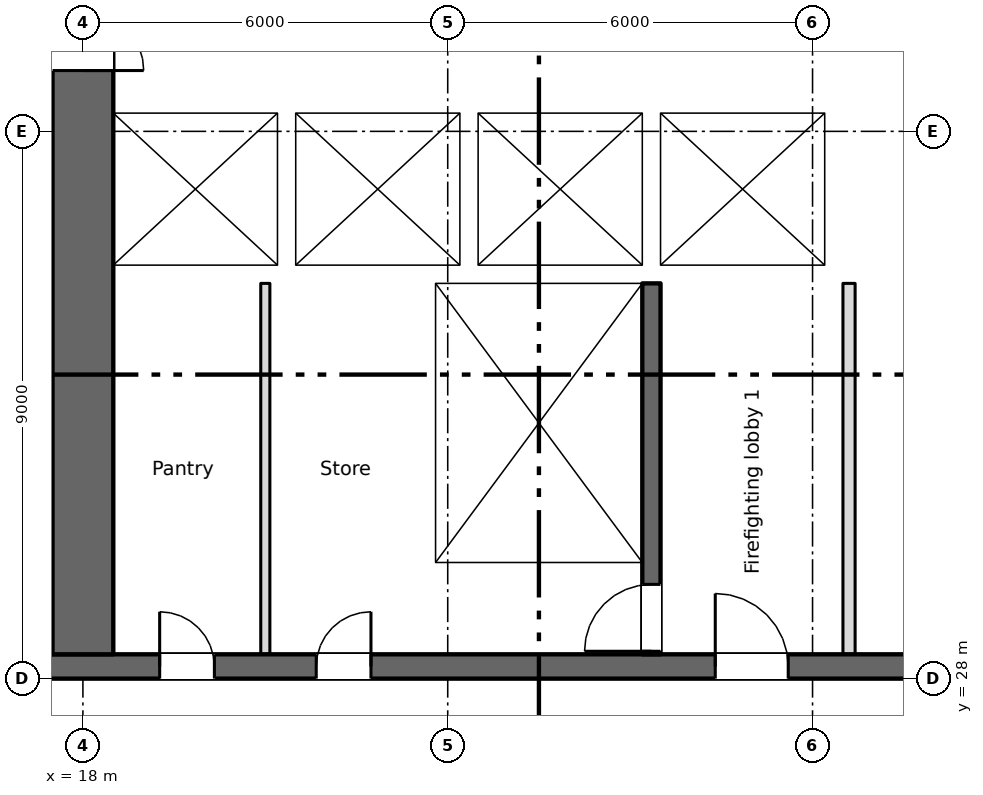
"""IFC4 building model, lengths in metres.
Left out: names, types, materials, properties, quantities, classifications, styles, units other than length and angle.
Written with IfcOpenShell. Run it as: python <this file> out.ifc"""

import sys

from ifc_helpers import new_model, si_unit, direction, frame, frame_2d, origin, place, context, subcontext, project, spatial, rectangle, extrude, element, fill, save


model = new_model("IFC4")
c1 = context("Model", 3, precision=1e-05, world=origin(), true_north=direction((0.0, 1.0)))
c2 = subcontext(c1, "Body", "Model", "MODEL_VIEW")
j1 = project(units=[si_unit("LENGTHUNIT", "METRE"), si_unit("PLANEANGLEUNIT", "RADIAN")], contexts=[c1])
p1 = place(None, origin())
s1 = spatial("IfcSite", under=j1, at=p1, CompositionType="ELEMENT")
p2 = place(p1, origin())
s2 = spatial("IfcBuilding", under=s1, at=p2, CompositionType="ELEMENT")
p3 = place(p2, frame((0.0, 0.0, 63.75)))
s3 = spatial("IfcBuildingStorey", under=s2, at=p3, CompositionType="ELEMENT", Elevation=63.75)
p4 = place(p3, frame((6.7, 28.2, 0.0), z_axis=(0.0, 0.0, 1.0), x_axis=(1.0, 0.0, 0.0)))
e1 = element("IfcWall", 1, at=p4, inside=s3, PredefinedType="SHEAR", context=c2, shape_type="SweptSolid", body=[
    extrude(rectangle(XDim=57.8, YDim=0.4, at=frame_2d((28.9, 0.0))), origin(), (0.0, 0.0, 1.0), 3.35),
])
p5 = place(p4, frame((12.562, 0.0, 0.0)))
e2 = element("IfcOpeningElement", 2, at=p5, cuts=e1, PredefinedType="OPENING", context=c2, shape_type="SweptSolid", body=[
    extrude(rectangle(XDim=0.9, YDim=2.1, at=frame_2d((0.45, 1.05))), frame((0.0, 0.21, 0.0), z_axis=(0.0, -1.0, 0.0), x_axis=(1.0, 0.0, 0.0)), (0.0, 0.0, 1.0), 0.42),
])
p6 = place(p4, frame((15.137, 0.0, 0.0)))
e3 = element("IfcOpeningElement", 3, at=p6, cuts=e1, PredefinedType="OPENING", context=c2, shape_type="SweptSolid", body=[
    extrude(rectangle(XDim=0.9, YDim=2.1, at=frame_2d((0.45, 1.05))), frame((0.0, 0.21, 0.0), z_axis=(0.0, -1.0, 0.0), x_axis=(1.0, 0.0, 0.0)), (0.0, 0.0, 1.0), 0.42),
])
p7 = place(p4, frame((49.85, 0.0, 0.0)))
e4 = element("IfcOpeningElement", 4, at=p7, cuts=e1, PredefinedType="OPENING", context=c2, shape_type="SweptSolid", body=[
    extrude(rectangle(XDim=0.9, YDim=2.1, at=frame_2d((0.45, 1.05))), frame((0.0, 0.21, 0.0), z_axis=(0.0, -1.0, 0.0), x_axis=(1.0, 0.0, 0.0)), (0.0, 0.0, 1.0), 0.42),
])
p8 = place(p4, frame((0.562, 0.0, 0.0)))
e5 = element("IfcOpeningElement", 5, at=p8, cuts=e1, PredefinedType="OPENING", context=c2, shape_type="SweptSolid", body=[
    extrude(rectangle(XDim=0.9, YDim=2.1, at=frame_2d((0.45, 1.05))), frame((0.0, 0.21, 0.0), z_axis=(0.0, -1.0, 0.0), x_axis=(1.0, 0.0, 0.0)), (0.0, 0.0, 1.0), 0.42),
])
p9 = place(p4, frame((2.137, 0.0, 0.0)))
e6 = element("IfcOpeningElement", 6, at=p9, cuts=e1, PredefinedType="OPENING", context=c2, shape_type="SweptSolid", body=[
    extrude(rectangle(XDim=0.9, YDim=2.1, at=frame_2d((0.45, 1.05))), frame((0.0, 0.21, 0.0), z_axis=(0.0, -1.0, 0.0), x_axis=(1.0, 0.0, 0.0)), (0.0, 0.0, 1.0), 0.42),
])
p10 = place(p4, frame((4.7, 0.0, 0.0)))
e7 = element("IfcOpeningElement", 7, at=p10, cuts=e1, PredefinedType="OPENING", context=c2, shape_type="SweptSolid", body=[
    extrude(rectangle(XDim=1.2, YDim=2.1, at=frame_2d((0.6, 1.05))), frame((0.0, 0.21, 0.0), z_axis=(0.0, -1.0, 0.0), x_axis=(1.0, 0.0, 0.0)), (0.0, 0.0, 1.0), 0.42),
])
p11 = place(p4, frame((31.7, 0.0, 0.0)))
e8 = element("IfcOpeningElement", 8, at=p11, cuts=e1, PredefinedType="OPENING", context=c2, shape_type="SweptSolid", body=[
    extrude(rectangle(XDim=1.2, YDim=2.1, at=frame_2d((0.6, 1.05))), frame((0.0, 0.21, 0.0), z_axis=(0.0, -1.0, 0.0), x_axis=(1.0, 0.0, 0.0)), (0.0, 0.0, 1.0), 0.42),
])
p12 = place(p4, frame((55.2, 0.0, 0.0)))
e9 = element("IfcOpeningElement", 9, at=p12, cuts=e1, PredefinedType="OPENING", context=c2, shape_type="SweptSolid", body=[
    extrude(rectangle(XDim=1.2, YDim=2.1, at=frame_2d((0.6, 1.05))), frame((0.0, 0.21, 0.0), z_axis=(0.0, -1.0, 0.0), x_axis=(1.0, 0.0, 0.0)), (0.0, 0.0, 1.0), 0.42),
])
p13 = place(p4, frame((21.7, 0.0, 0.0)))
e10 = element("IfcOpeningElement", 10, at=p13, cuts=e1, PredefinedType="OPENING", context=c2, shape_type="SweptSolid", body=[
    extrude(rectangle(XDim=1.2, YDim=2.1, at=frame_2d((0.6, 1.05))), frame((0.0, 0.21, 0.0), z_axis=(0.0, -1.0, 0.0), x_axis=(1.0, 0.0, 0.0)), (0.0, 0.0, 1.0), 0.42),
])
p14 = place(p4, frame((41.7, 0.0, 0.0)))
e11 = element("IfcOpeningElement", 11, at=p14, cuts=e1, PredefinedType="OPENING", context=c2, shape_type="SweptSolid", body=[
    extrude(rectangle(XDim=1.2, YDim=2.1, at=frame_2d((0.6, 1.05))), frame((0.0, 0.21, 0.0), z_axis=(0.0, -1.0, 0.0), x_axis=(1.0, 0.0, 0.0)), (0.0, 0.0, 1.0), 0.42),
])
p15 = place(p4, frame((24.85, 0.0, 0.0)))
e12 = element("IfcOpeningElement", 12, at=p15, cuts=e1, PredefinedType="OPENING", context=c2, shape_type="SweptSolid", body=[
    extrude(rectangle(XDim=2.4, YDim=2.1, at=frame_2d((1.2, 1.05))), frame((0.0, 0.21, 0.0), z_axis=(0.0, -1.0, 0.0), x_axis=(1.0, 0.0, 0.0)), (0.0, 0.0, 1.0), 0.42),
])
p16 = place(p4, frame((37.35, 0.0, 0.0)))
e13 = element("IfcOpeningElement", 13, at=p16, cuts=e1, PredefinedType="OPENING", context=c2, shape_type="SweptSolid", body=[
    extrude(rectangle(XDim=2.4, YDim=2.1, at=frame_2d((1.2, 1.05))), frame((0.0, 0.21, 0.0), z_axis=(0.0, -1.0, 0.0), x_axis=(1.0, 0.0, 0.0)), (0.0, 0.0, 1.0), 0.42),
])
p17 = place(p4, frame((7.85, 0.0, 0.0)))
e14 = element("IfcOpeningElement", 14, at=p17, cuts=e1, PredefinedType="OPENING", context=c2, shape_type="SweptSolid", body=[
    extrude(rectangle(XDim=2.4, YDim=2.1, at=frame_2d((1.2, 1.05))), frame((0.0, 0.21, 0.0), z_axis=(0.0, -1.0, 0.0), x_axis=(1.0, 0.0, 0.0)), (0.0, 0.0, 1.0), 0.42),
])
p18 = place(p4, frame((28.85, 0.0, 0.0)))
e15 = element("IfcOpeningElement", 15, at=p18, cuts=e1, PredefinedType="OPENING", context=c2, shape_type="SweptSolid", body=[
    extrude(rectangle(XDim=0.9, YDim=2.1, at=frame_2d((0.45, 1.05))), frame((0.0, 0.21, 0.0), z_axis=(0.0, -1.0, 0.0), x_axis=(1.0, 0.0, 0.0)), (0.0, 0.0, 1.0), 0.42),
])
p19 = place(p4, frame((34.85, 0.0, 0.0)))
e16 = element("IfcOpeningElement", 16, at=p19, cuts=e1, PredefinedType="OPENING", context=c2, shape_type="SweptSolid", body=[
    extrude(rectangle(XDim=0.9, YDim=2.1, at=frame_2d((0.45, 1.05))), frame((0.0, 0.21, 0.0), z_axis=(0.0, -1.0, 0.0), x_axis=(1.0, 0.0, 0.0)), (0.0, 0.0, 1.0), 0.42),
])
p20 = place(p3, frame((18.0, 28.4, 0.0), z_axis=(0.0, 0.0, 1.0), x_axis=(0.0, 1.0, 0.0)))
e17 = element("IfcWall", 17, at=p20, inside=s3, PredefinedType="SHEAR", context=c2, shape_type="SweptSolid", body=[
    extrude(rectangle(XDim=16.6, YDim=1.0, at=frame_2d((8.3, 0.0))), origin(), (0.0, 0.0, 1.0), 3.35),
])
p21 = place(p20, frame((9.6, 0.0, 0.0)))
e18 = element("IfcOpeningElement", 18, at=p21, cuts=e17, PredefinedType="OPENING", context=c2, shape_type="SweptSolid", body=[
    extrude(rectangle(XDim=2.0, YDim=2.1, at=frame_2d((1.0, 1.05))), frame((0.0, 0.51, 0.0), z_axis=(0.0, -1.0, 0.0), x_axis=(1.0, 0.0, 0.0)), (0.0, 0.0, 1.0), 1.02),
])
p22 = place(p20, frame((15.25, 0.0, 0.0)))
e19 = element("IfcOpeningElement", 19, at=p22, cuts=e17, PredefinedType="OPENING", context=c2, shape_type="SweptSolid", body=[
    extrude(rectangle(XDim=1.2, YDim=2.1, at=frame_2d((0.6, 1.05))), frame((0.0, 0.51, 0.0), z_axis=(0.0, -1.0, 0.0), x_axis=(1.0, 0.0, 0.0)), (0.0, 0.0, 1.0), 1.02),
])
p23 = place(p3, frame((23.65, 28.4, 0.0), z_axis=(0.0, 0.0, 1.0), x_axis=(0.0, 1.0, 0.0)))
e20 = element("IfcWall", 20, at=p23, inside=s3, PredefinedType="SHEAR", context=c2, shape_type="SweptSolid", body=[
    extrude(rectangle(XDim=6.1, YDim=0.3, at=frame_2d((3.05, 0.0))), origin(), (0.0, 0.0, 1.0), 3.35),
])
p24 = place(p3, frame((27.35, 28.4, 0.0), z_axis=(0.0, 0.0, 1.0), x_axis=(0.0, 1.0, 0.0)))
e21 = element("IfcWall", 21, at=p24, inside=s3, PredefinedType="SHEAR", context=c2, shape_type="SweptSolid", body=[
    extrude(rectangle(XDim=6.1, YDim=0.3, at=frame_2d((3.05, 0.0))), origin(), (0.0, 0.0, 1.0), 3.35),
])
p25 = place(p24, frame((0.05, 0.0, 0.0)))
e22 = element("IfcOpeningElement", 22, at=p25, cuts=e21, PredefinedType="OPENING", context=c2, shape_type="SweptSolid", body=[
    extrude(rectangle(XDim=1.1, YDim=2.1, at=frame_2d((0.55, 1.05))), frame((0.0, 0.16, 0.0), z_axis=(0.0, -1.0, 0.0), x_axis=(1.0, 0.0, 0.0)), (0.0, 0.0, 1.0), 0.32),
])
p26 = place(p3, frame((18.5, 34.65, 0.0), z_axis=(0.0, 0.0, 1.0), x_axis=(1.0, 0.0, 0.0)))
e23 = element("IfcWall", 23, at=p26, inside=s3, PredefinedType="SHEAR", context=c2, shape_type="SweptSolid", body=[
    extrude(rectangle(XDim=12.2, YDim=0.3, at=frame_2d((6.1, 0.0))), origin(), (0.0, 0.0, 1.0), 3.35),
])
p27 = place(p26, frame((9.8, 0.0, 0.0)))
e24 = element("IfcOpeningElement", 24, at=p27, cuts=e23, PredefinedType="OPENING", context=c2, shape_type="SweptSolid", body=[
    extrude(rectangle(XDim=1.1, YDim=2.1, at=frame_2d((0.55, 1.05))), frame((0.0, 0.16, 0.0), z_axis=(0.0, -1.0, 0.0), x_axis=(1.0, 0.0, 0.0)), (0.0, 0.0, 1.0), 0.32),
])
p28 = place(p3, frame((18.5, 37.45, 0.0), z_axis=(0.0, 0.0, 1.0), x_axis=(1.0, 0.0, 0.0)))
e25 = element("IfcWall", 25, at=p28, inside=s3, PredefinedType="SHEAR", context=c2, shape_type="SweptSolid", body=[
    extrude(rectangle(XDim=12.2, YDim=0.3, at=frame_2d((6.1, 0.0))), origin(), (0.0, 0.0, 1.0), 3.35),
])
p29 = place(p28, frame((0.8, 0.0, 0.0)))
e26 = element("IfcOpeningElement", 26, at=p29, cuts=e25, PredefinedType="OPENING", context=c2, shape_type="SweptSolid", body=[
    extrude(rectangle(XDim=1.1, YDim=2.1, at=frame_2d((0.55, 1.05))), frame((0.0, 0.16, 0.0), z_axis=(0.0, -1.0, 0.0), x_axis=(1.0, 0.0, 0.0)), (0.0, 0.0, 1.0), 0.32),
])
p30 = place(p28, frame((3.8, 0.0, 0.0)))
e27 = element("IfcOpeningElement", 27, at=p30, cuts=e25, PredefinedType="OPENING", context=c2, shape_type="SweptSolid", body=[
    extrude(rectangle(XDim=1.1, YDim=2.1, at=frame_2d((0.55, 1.05))), frame((0.0, 0.16, 0.0), z_axis=(0.0, -1.0, 0.0), x_axis=(1.0, 0.0, 0.0)), (0.0, 0.0, 1.0), 0.32),
])
p31 = place(p28, frame((6.8, 0.0, 0.0)))
e28 = element("IfcOpeningElement", 28, at=p31, cuts=e25, PredefinedType="OPENING", context=c2, shape_type="SweptSolid", body=[
    extrude(rectangle(XDim=1.1, YDim=2.1, at=frame_2d((0.55, 1.05))), frame((0.0, 0.16, 0.0), z_axis=(0.0, -1.0, 0.0), x_axis=(1.0, 0.0, 0.0)), (0.0, 0.0, 1.0), 0.32),
])
p32 = place(p3, frame((27.35, 34.8, 0.0), z_axis=(0.0, 0.0, 1.0), x_axis=(0.0, 1.0, 0.0)))
e29 = element("IfcWall", 29, at=p32, inside=s3, PredefinedType="SHEAR", context=c2, shape_type="SweptSolid", body=[
    extrude(rectangle(XDim=2.5, YDim=0.3, at=frame_2d((1.25, 0.0))), origin(), (0.0, 0.0, 1.0), 3.35),
])
p33 = place(p3, frame((30.45, 34.8, 0.0), z_axis=(0.0, 0.0, 1.0), x_axis=(0.0, 1.0, 0.0)))
e30 = element("IfcWall", 30, at=p33, inside=s3, PredefinedType="SHEAR", context=c2, shape_type="SweptSolid", body=[
    extrude(rectangle(XDim=2.5, YDim=0.5, at=frame_2d((1.25, 0.0))), origin(), (0.0, 0.0, 1.0), 3.35),
])
for number, where, z_axis, x_axis in (
    (31, (21.35, 34.8, 0.0), (0.0, 0.0, 1.0), (0.0, 1.0, 0.0)),
    (32, (24.35, 34.8, 0.0), (0.0, 0.0, 1.0), (0.0, 1.0, 0.0)),
):
    element("IfcWall", number, at=place(p3, frame(where, z_axis=z_axis, x_axis=x_axis)), inside=s3, PredefinedType="SHEAR", context=c2, shape_type="SweptSolid", body=[
        extrude(rectangle(XDim=2.5, YDim=0.3, at=frame_2d((1.25, 0.0))), origin(), (0.0, 0.0, 1.0), 3.35),
    ])
p34 = place(p3, frame((30.6, 28.4, 0.0), z_axis=(0.0, 0.0, 1.0), x_axis=(0.0, 1.0, 0.0)))
e33 = element("IfcWall", 33, at=p34, inside=s3, PredefinedType="PARTITIONING", context=c2, shape_type="SweptSolid", body=[
    extrude(rectangle(XDim=6.1, YDim=0.2, at=frame_2d((3.05, 0.0))), origin(), (0.0, 0.0, 1.0), 3.35),
])
p35 = place(p3, frame((21.0, 28.4, 0.0), z_axis=(0.0, 0.0, 1.0), x_axis=(0.0, 1.0, 0.0)))
e34 = element("IfcWall", 34, at=p35, inside=s3, PredefinedType="PARTITIONING", context=c2, shape_type="SweptSolid", body=[
    extrude(rectangle(XDim=6.1, YDim=0.15, at=frame_2d((3.05, 0.0))), origin(), (0.0, 0.0, 1.0), 3.35),
])
p36 = place(p5, origin())
e35 = element("IfcDoor", 35, at=p36, inside=s3, OperationType="SINGLE_SWING_LEFT", PredefinedType="DOOR", context=c2, shape_type="SweptSolid", body=[
    extrude(rectangle(XDim=0.9, YDim=2.1, at=frame_2d((0.45, 1.05))), frame((0.0, 0.025, 0.0), z_axis=(0.0, -1.0, 0.0), x_axis=(1.0, 0.0, 0.0)), (0.0, 0.0, 1.0), 0.05),
])
fill(e2, e35)
p37 = place(p6, origin())
e36 = element("IfcDoor", 36, at=p37, inside=s3, OperationType="SINGLE_SWING_RIGHT", PredefinedType="DOOR", context=c2, shape_type="SweptSolid", body=[
    extrude(rectangle(XDim=0.9, YDim=2.1, at=frame_2d((0.45, 1.05))), frame((0.0, 0.025, 0.0), z_axis=(0.0, -1.0, 0.0), x_axis=(1.0, 0.0, 0.0)), (0.0, 0.0, 1.0), 0.05),
])
fill(e3, e36)
p38 = place(p29, origin())
e37 = element("IfcDoor", 37, at=p38, inside=s3, OperationType="SLIDING_TO_LEFT", PredefinedType="DOOR", context=c2, shape_type="SweptSolid", body=[
    extrude(rectangle(XDim=1.1, YDim=2.1, at=frame_2d((0.55, 1.05))), frame((0.0, 0.025, 0.0), z_axis=(0.0, -1.0, 0.0), x_axis=(1.0, 0.0, 0.0)), (0.0, 0.0, 1.0), 0.05),
])
fill(e26, e37)
p39 = place(p30, origin())
e38 = element("IfcDoor", 38, at=p39, inside=s3, OperationType="SLIDING_TO_LEFT", PredefinedType="DOOR", context=c2, shape_type="SweptSolid", body=[
    extrude(rectangle(XDim=1.1, YDim=2.1, at=frame_2d((0.55, 1.05))), frame((0.0, 0.025, 0.0), z_axis=(0.0, -1.0, 0.0), x_axis=(1.0, 0.0, 0.0)), (0.0, 0.0, 1.0), 0.05),
])
fill(e27, e38)
p40 = place(p31, origin())
e39 = element("IfcDoor", 39, at=p40, inside=s3, OperationType="SLIDING_TO_LEFT", PredefinedType="DOOR", context=c2, shape_type="SweptSolid", body=[
    extrude(rectangle(XDim=1.1, YDim=2.1, at=frame_2d((0.55, 1.05))), frame((0.0, 0.025, 0.0), z_axis=(0.0, -1.0, 0.0), x_axis=(1.0, 0.0, 0.0)), (0.0, 0.0, 1.0), 0.05),
])
fill(e28, e39)
p41 = place(p27, origin())
e40 = element("IfcDoor", 40, at=p41, inside=s3, OperationType="SLIDING_TO_LEFT", PredefinedType="DOOR", context=c2, shape_type="SweptSolid", body=[
    extrude(rectangle(XDim=1.1, YDim=2.1, at=frame_2d((0.55, 1.05))), frame((0.0, 0.025, 0.0), z_axis=(0.0, -1.0, 0.0), x_axis=(1.0, 0.0, 0.0)), (0.0, 0.0, 1.0), 0.05),
])
fill(e24, e40)
p42 = place(p25, origin())
e41 = element("IfcDoor", 41, at=p42, inside=s3, OperationType="SINGLE_SWING_LEFT", PredefinedType="DOOR", context=c2, shape_type="SweptSolid", body=[
    extrude(rectangle(XDim=1.1, YDim=2.1, at=frame_2d((0.55, 1.05))), frame((0.0, 0.025, 0.0), z_axis=(0.0, -1.0, 0.0), x_axis=(1.0, 0.0, 0.0)), (0.0, 0.0, 1.0), 0.05),
])
fill(e22, e41)
p43 = place(p13, origin())
e42 = element("IfcDoor", 42, at=p43, inside=s3, OperationType="SINGLE_SWING_LEFT", PredefinedType="DOOR", context=c2, shape_type="SweptSolid", body=[
    extrude(rectangle(XDim=1.2, YDim=2.1, at=frame_2d((0.6, 1.05))), frame((0.0, 0.025, 0.0), z_axis=(0.0, -1.0, 0.0), x_axis=(1.0, 0.0, 0.0)), (0.0, 0.0, 1.0), 0.05),
])
fill(e10, e42)
p44 = place(p21, origin())
e43 = element("IfcDoor", 43, at=p44, inside=s3, OperationType="DOUBLE_DOOR_SINGLE_SWING", PredefinedType="DOOR", context=c2, shape_type="SweptSolid", body=[
    extrude(rectangle(XDim=2.0, YDim=2.1, at=frame_2d((1.0, 1.05))), frame((0.0, 0.025, 0.0), z_axis=(0.0, -1.0, 0.0), x_axis=(1.0, 0.0, 0.0)), (0.0, 0.0, 1.0), 0.05),
])
fill(e18, e43)
save(model, sys.argv[1])
